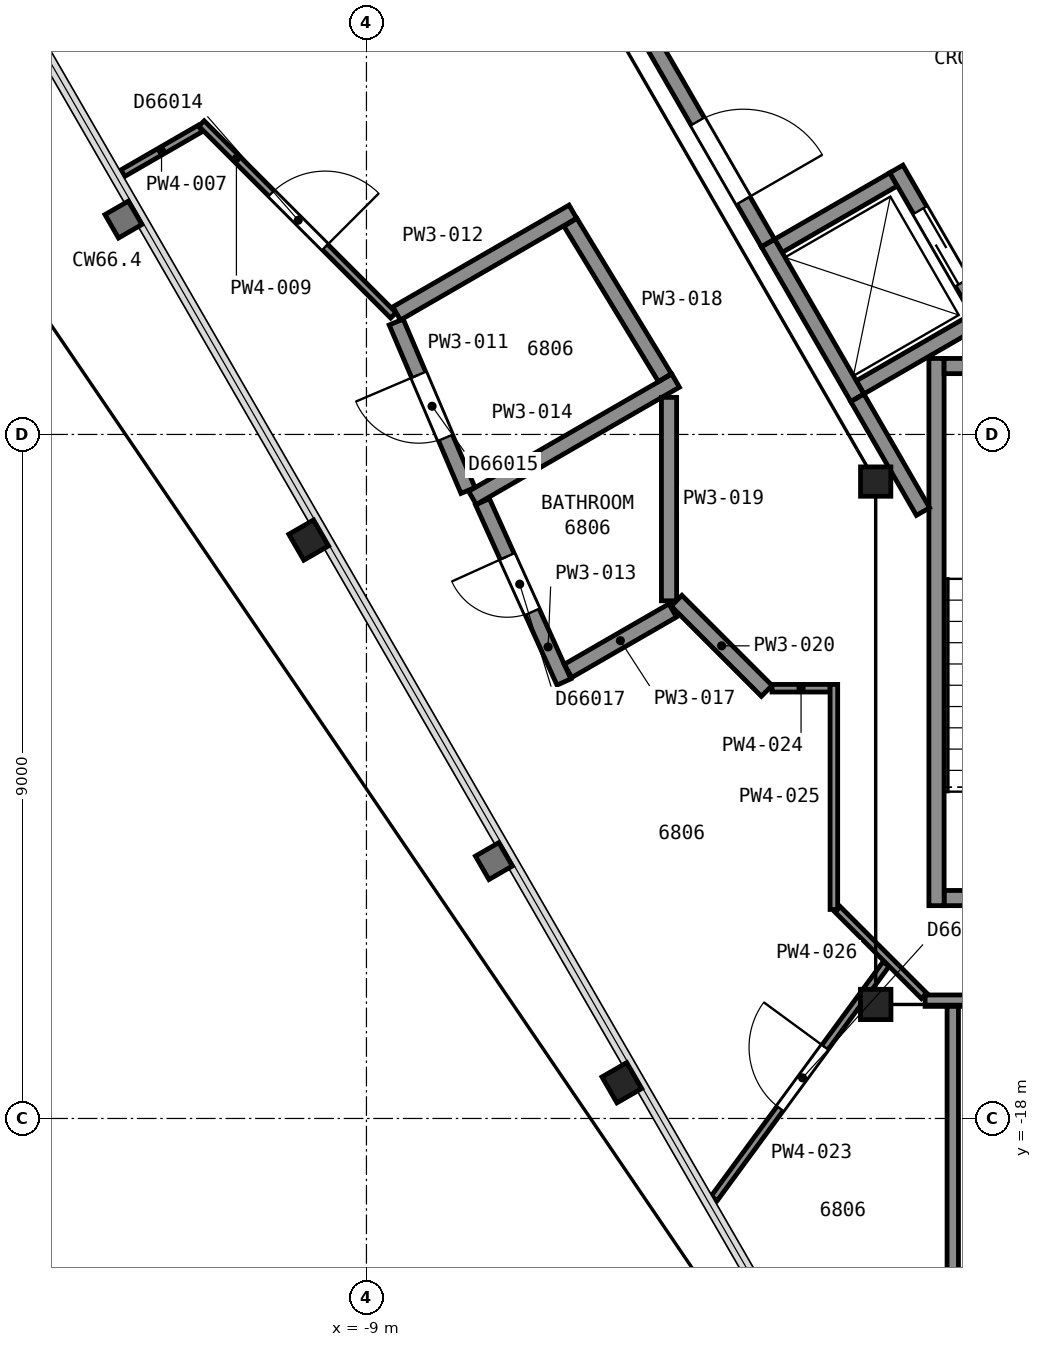
"""IFC4 building model, lengths in metres.
Left out: names, types, materials, properties, quantities, classifications, styles, units other than length and angle.
Written with IfcOpenShell. Run it as: python <this file> out.ifc"""

import sys

from ifc_helpers import new_model, si_unit, direction, frame, frame_2d, origin, origin_2d, place, context, subcontext, project, spatial, rectangle, i_section, extrude, element, fill, save


model = new_model("IFC4")
c1 = context("Model", 3, precision=1e-05, world=origin(), true_north=direction((0.0, 1.0)))
c2 = subcontext(c1, "Body", "Model", "MODEL_VIEW")
j1 = project(units=[si_unit("LENGTHUNIT", "METRE"), si_unit("PLANEANGLEUNIT", "RADIAN")], contexts=[c1])
p1 = place(None, origin())
s1 = spatial("IfcSite", under=j1, at=p1, CompositionType="ELEMENT")
p2 = place(p1, origin())
s2 = spatial("IfcBuilding", under=s1, at=p2, CompositionType="ELEMENT")
p3 = place(p2, frame((0.0, 0.0, 271.4)))
s3 = spatial("IfcBuildingStorey", under=s2, at=p3, CompositionType="ELEMENT", Elevation=271.4)
for number, where, z_axis, x_axis in (
    (1, (-9.76, -10.39, 0.0), (0.0, 0.0, 1.0), (-0.5, 0.866, 0.0)),
    (2, (-5.64, -17.53, 0.0), (0.0, 0.0, 1.0), (-0.5, 0.866, 0.0)),
):
    element("IfcColumn", number, at=place(p3, frame(where, z_axis=z_axis, x_axis=x_axis)), inside=s3, PredefinedType="COLUMN", context=c2, shape_type="SweptSolid", body=[
        extrude(i_section(OverallWidth=0.394, OverallDepth=0.376, WebThickness=0.017, FlangeThickness=0.028, FilletRadius=0.015, at=origin_2d()), origin(), (0.0, 0.0, 1.0), 3.7),
    ])
p4 = place(p3, frame((-2.3, -9.62, 0.0), z_axis=(0.0, 0.0, 1.0), x_axis=(1.0, 0.0, 0.0)))
e3 = element("IfcColumn", 3, at=p4, inside=s3, PredefinedType="COLUMN", context=c2, shape_type="SweptSolid", body=[
    extrude(i_section(OverallWidth=0.399, OverallDepth=0.386, WebThickness=0.021, FlangeThickness=0.033, FilletRadius=0.015, at=origin_2d()), origin(), (0.0, 0.0, 1.0), 3.7),
])
p5 = place(p3, frame((-2.3, -16.5, 0.0), z_axis=(0.0, 0.0, 1.0), x_axis=(-1.0, 0.0, 0.0)))
e4 = element("IfcColumn", 4, at=p5, inside=s3, PredefinedType="COLUMN", context=c2, shape_type="SweptSolid", body=[
    extrude(i_section(OverallWidth=0.401, OverallDepth=0.399, WebThickness=0.025, FlangeThickness=0.04, FilletRadius=0.015, at=origin_2d()), origin(), (0.0, 0.0, 1.0), 3.7),
])
p6 = place(p3, frame((-1.4, -15.1, 0.0), z_axis=(0.0, 0.0, 1.0), x_axis=(1.0, 0.0, 0.0)))
e5 = element("IfcWall", 5, at=p6, inside=s3, PredefinedType="PARTITIONING", context=c2, shape_type="SweptSolid", body=[
    extrude(rectangle(XDim=2.8, YDim=0.2, at=frame_2d((1.4, 0.0))), origin(), (0.0, 0.0, 1.0), 3.45),
])
p7 = place(p6, frame((0.85, 0.0, 0.0)))
e6 = element("IfcOpeningElement", 6, at=p7, cuts=e5, PredefinedType="OPENING", context=c2, shape_type="SweptSolid", body=[
    extrude(rectangle(XDim=1.1, YDim=2.1, at=frame_2d((0.55, 1.05))), frame((0.0, 0.11, 0.0), z_axis=(0.0, -1.0, 0.0), x_axis=(1.0, 0.0, 0.0)), (0.0, 0.0, 1.0), 0.22),
])
p8 = place(p3, frame((-1.5, -8.0, 0.0), z_axis=(0.0, 0.0, 1.0), x_axis=(0.0, -1.0, 0.0)))
e7 = element("IfcWall", 7, at=p8, inside=s3, PredefinedType="PARTITIONING", context=c2, shape_type="SweptSolid", body=[
    extrude(rectangle(XDim=7.2, YDim=0.2, at=frame_2d((3.6, 0.0))), origin(), (0.0, 0.0, 1.0), 3.45),
])
p9 = place(p3, frame((-1.4, -8.1, 0.0), z_axis=(0.0, 0.0, 1.0), x_axis=(1.0, 0.0, 0.0)))
e8 = element("IfcWall", 8, at=p9, inside=s3, PredefinedType="PARTITIONING", context=c2, shape_type="SweptSolid", body=[
    extrude(rectangle(XDim=2.8, YDim=0.2, at=frame_2d((1.4, 0.0))), origin(), (0.0, 0.0, 1.0), 3.45),
])
for number, where, z_axis, x_axis in (
    (9, (-2.505, -8.38, 0.0), (0.0, 0.0, 1.0), (0.866, 0.5, 0.0)),
    (10, (-3.58, -6.519, 0.0), (0.0, 0.0, 1.0), (0.866, 0.5, 0.0)),
):
    element("IfcWall", number, at=place(p3, frame(where, z_axis=z_axis, x_axis=x_axis)), inside=s3, PredefinedType="PARTITIONING", context=c2, shape_type="SweptSolid", body=[
        extrude(rectangle(XDim=1.75, YDim=0.2, at=frame_2d((0.875, 0.0))), origin(), (0.0, 0.0, 1.0), 3.7),
    ])
p10 = place(p3, frame((-0.853, -7.542, 0.0), z_axis=(0.0, 0.0, 1.0), x_axis=(-0.500016218704, 0.866016039709, 0.0)))
e11 = element("IfcWall", 11, at=p10, inside=s3, PredefinedType="PARTITIONING", context=c2, shape_type="SweptSolid", body=[
    extrude(rectangle(XDim=2.35, YDim=0.2, at=frame_2d((1.175, 0.0))), origin(), (0.0, 0.0, 1.0), 3.7),
])
p11 = place(p10, frame((0.625, 0.0, 0.0)))
e12 = element("IfcOpeningElement", 12, at=p11, cuts=e11, PredefinedType="OPENING", context=c2, shape_type="SweptSolid", body=[
    extrude(rectangle(XDim=1.1, YDim=2.1, at=frame_2d((0.55, 1.05))), frame((0.0, 0.11, 0.0), z_axis=(0.0, -1.0, 0.0), x_axis=(1.0, 0.0, 0.0)), (0.0, 0.0, 1.0), 0.22),
])
p12 = place(p3, frame((-2.542, -8.517, 0.0), z_axis=(0.0, 0.0, 1.0), x_axis=(-0.500016218704, 0.866016039709, 0.0)))
e13 = element("IfcWall", 13, at=p12, inside=s3, PredefinedType="PARTITIONING", context=c2, shape_type="SweptSolid", body=[
    extrude(rectangle(XDim=2.35, YDim=0.2, at=frame_2d((1.175, 0.0))), origin(), (0.0, 0.0, 1.0), 3.7),
])
p13 = place(p3, frame((-7.141, -0.551, 0.0), z_axis=(0.0, 0.0, 1.0), x_axis=(0.500001302854, -0.86602465158, 0.0)))
e14 = element("IfcWall", 14, at=p13, inside=s3, PredefinedType="PARTITIONING", context=c2, shape_type="SweptSolid", body=[
    extrude(rectangle(XDim=6.846, YDim=0.2, at=frame_2d((3.423, 0.0))), origin(), (0.0, 0.0, 1.0), 3.45),
])
p14 = place(p13, frame((5.0, 0.0, 0.0)))
e15 = element("IfcOpeningElement", 15, at=p14, cuts=e14, PredefinedType="OPENING", context=c2, shape_type="SweptSolid", body=[
    extrude(rectangle(XDim=1.2, YDim=2.1, at=frame_2d((0.6, 1.05))), frame((0.0, 0.11, 0.0), z_axis=(0.0, -1.0, 0.0), x_axis=(1.0, 0.0, 0.0)), (0.0, 0.0, 1.0), 0.22),
])
p15 = place(p3, frame((-2.541, -8.519, 0.0), z_axis=(0.0, 0.0, 1.0), x_axis=(0.500016142392, -0.86601608377, 0.0)))
e16 = element("IfcWall", 16, at=p15, inside=s3, PredefinedType="PARTITIONING", context=c2, shape_type="SweptSolid", body=[
    extrude(rectangle(XDim=1.727, YDim=0.2, at=frame_2d((0.864, 0.0))), origin(), (0.0, 0.0, 1.0), 3.45),
])
p16 = place(p3, frame((-12.205, -5.562, 0.0), z_axis=(0.0, 0.0, 1.0), x_axis=(0.865895054285, 0.500225704022, 0.0)))
e17 = element("IfcWall", 17, at=p16, inside=s3, PredefinedType="PARTITIONING", context=c2, shape_type="SweptSolid", body=[
    extrude(rectangle(XDim=1.176, YDim=0.1, at=frame_2d((0.588, 0.0))), origin(), (0.0, 0.0, 1.0), 2.723),
])
p17 = place(p3, frame((-8.646, -7.433, 0.0), z_axis=(0.0, 0.0, 1.0), x_axis=(-0.707106781187, 0.707106781187, 0.0)))
e18 = element("IfcWall", 18, at=p17, inside=s3, PredefinedType="PARTITIONING", context=c2, shape_type="SweptSolid", body=[
    extrude(rectangle(XDim=3.57, YDim=0.1, at=frame_2d((1.785, 0.0))), origin(), (0.0, 0.0, 1.0), 2.723),
])
p18 = place(p17, frame((1.27, 0.0, 0.0)))
e19 = element("IfcOpeningElement", 19, at=p18, cuts=e18, PredefinedType="OPENING", context=c2, shape_type="SweptSolid", body=[
    extrude(rectangle(XDim=1.0, YDim=2.1, at=frame_2d((0.5, 1.05))), frame((0.0, 0.06, 0.0), z_axis=(0.0, -1.0, 0.0), x_axis=(1.0, 0.0, 0.0)), (0.0, 0.0, 1.0), 0.12),
])
p19 = place(p3, frame((-8.609, -7.521, 0.0), z_axis=(0.0, 0.0, 1.0), x_axis=(0.391998641344, -0.91996579566, 0.0)))
e20 = element("IfcWall", 20, at=p19, inside=s3, PredefinedType="PARTITIONING", context=c2, shape_type="SweptSolid", body=[
    extrude(rectangle(XDim=2.41, YDim=0.2, at=frame_2d((1.205, 0.0))), origin(), (0.0, 0.0, 1.0), 2.723),
])
p20 = place(p19, frame((0.755, 0.0, 0.0)))
e21 = element("IfcOpeningElement", 21, at=p20, cuts=e20, PredefinedType="OPENING", context=c2, shape_type="SweptSolid", body=[
    extrude(rectangle(XDim=0.9, YDim=2.1, at=frame_2d((0.45, 1.05))), frame((0.0, 0.11, 0.0), z_axis=(0.0, -1.0, 0.0), x_axis=(1.0, 0.0, 0.0)), (0.0, 0.0, 1.0), 0.22),
])
p21 = place(p3, frame((-8.603, -7.408, 0.0), z_axis=(0.0, 0.0, 1.0), x_axis=(0.865966883336, 0.500101346695, 0.0)))
e22 = element("IfcWall", 22, at=p21, inside=s3, PredefinedType="PARTITIONING", context=c2, shape_type="SweptSolid", body=[
    extrude(rectangle(XDim=2.677, YDim=0.2, at=frame_2d((1.339, 0.0))), origin(), (0.0, 0.0, 1.0), 2.723),
])
p22 = place(p3, frame((-7.474, -9.885, 0.0), z_axis=(0.0, 0.0, 1.0), x_axis=(0.411787773138, -0.911279775862, 0.0)))
e23 = element("IfcWall", 23, at=p22, inside=s3, PredefinedType="PARTITIONING", context=c2, shape_type="SweptSolid", body=[
    extrude(rectangle(XDim=2.603, YDim=0.2, at=frame_2d((1.301, 0.0))), origin(), (0.0, 0.0, 1.0), 2.723),
])
p23 = place(p22, frame((0.79, 0.0, 0.0)))
e24 = element("IfcOpeningElement", 24, at=p23, cuts=e23, PredefinedType="OPENING", context=c2, shape_type="SweptSolid", body=[
    extrude(rectangle(XDim=0.8, YDim=2.1, at=frame_2d((0.4, 1.05))), frame((0.0, 0.11, 0.0), z_axis=(0.0, -1.0, 0.0), x_axis=(1.0, 0.0, 0.0)), (0.0, 0.0, 1.0), 0.22),
])
p24 = place(p3, frame((-7.606, -9.835, 0.0), z_axis=(0.0, 0.0, 1.0), x_axis=(0.866093395895, 0.499882215713, 0.0)))
e25 = element("IfcWall", 25, at=p24, inside=s3, PredefinedType="PARTITIONING", context=c2, shape_type="SweptSolid", body=[
    extrude(rectangle(XDim=3.087, YDim=0.2, at=frame_2d((1.543, 0.0))), origin(), (0.0, 0.0, 1.0), 2.723),
])
p25 = place(p3, frame((-6.348, -12.111, 0.0), z_axis=(0.0, 0.0, 1.0), x_axis=(0.866004001318, 0.500037068326, 0.0)))
e26 = element("IfcWall", 26, at=p25, inside=s3, PredefinedType="PARTITIONING", context=c2, shape_type="SweptSolid", body=[
    extrude(rectangle(XDim=1.59, YDim=0.2, at=frame_2d((0.795, 0.0))), origin(), (0.0, 0.0, 1.0), 2.723),
])
p26 = place(p3, frame((-6.316, -6.209, 0.0), z_axis=(0.0, 0.0, 1.0), x_axis=(0.519665190876, -0.854369995606, 0.0)))
e27 = element("IfcWall", 27, at=p26, inside=s3, PredefinedType="PARTITIONING", context=c2, shape_type="SweptSolid", body=[
    extrude(rectangle(XDim=2.392, YDim=0.2, at=frame_2d((1.196, 0.0))), origin(), (0.0, 0.0, 1.0), 2.723),
])
p27 = place(p3, frame((-5.019, -11.189, 0.0), z_axis=(0.0, 0.0, 1.0), x_axis=(0.0, 1.0, 0.0)))
e28 = element("IfcWall", 28, at=p27, inside=s3, PredefinedType="PARTITIONING", context=c2, shape_type="SweptSolid", body=[
    extrude(rectangle(XDim=2.677, YDim=0.2, at=frame_2d((1.338, 0.0))), origin(), (0.0, 0.0, 1.0), 2.723),
])
p28 = place(p3, frame((-4.92, -11.188, 0.0), z_axis=(0.0, 0.0, 1.0), x_axis=(0.707106781187, -0.707106781187, 0.0)))
e29 = element("IfcWall", 29, at=p28, inside=s3, PredefinedType="PARTITIONING", context=c2, shape_type="SweptSolid", body=[
    extrude(rectangle(XDim=1.678, YDim=0.2, at=frame_2d((0.839, 0.0))), origin(), (0.0, 0.0, 1.0), 2.723),
])
p29 = place(p3, frame((-2.164, -15.968, 0.0), z_axis=(0.0, 0.0, 1.0), x_axis=(-0.591435630084, -0.806352215516, 0.0)))
e30 = element("IfcWall", 30, at=p29, inside=s3, PredefinedType="PARTITIONING", context=c2, shape_type="SweptSolid", body=[
    extrude(rectangle(XDim=3.824, YDim=0.1, at=frame_2d((1.912, 0.0))), origin(), (0.0, 0.0, 1.0), 2.723),
])
p30 = place(p29, frame((1.358, 0.0, 0.0)))
e31 = element("IfcOpeningElement", 31, at=p30, cuts=e30, PredefinedType="OPENING", context=c2, shape_type="SweptSolid", body=[
    extrude(rectangle(XDim=1.0, YDim=2.1, at=frame_2d((0.5, 1.05))), frame((0.0, 0.06, 0.0), z_axis=(0.0, -1.0, 0.0), x_axis=(1.0, 0.0, 0.0)), (0.0, 0.0, 1.0), 0.12),
])
p31 = place(p3, frame((-3.664, -12.339, 0.0), z_axis=(0.0, 0.0, 1.0), x_axis=(1.0, 0.0, 0.0)))
e32 = element("IfcWall", 32, at=p31, inside=s3, PredefinedType="PARTITIONING", context=c2, shape_type="SweptSolid", body=[
    extrude(rectangle(XDim=0.764, YDim=0.1, at=frame_2d((0.382, 0.0))), origin(), (0.0, 0.0, 1.0), 2.723),
])
p32 = place(p3, frame((-2.85, -15.25, 0.0), z_axis=(0.0, 0.0, 1.0), x_axis=(0.0, 1.0, 0.0)))
e33 = element("IfcWall", 33, at=p32, inside=s3, PredefinedType="PARTITIONING", context=c2, shape_type="SweptSolid", body=[
    extrude(rectangle(XDim=2.961, YDim=0.1, at=frame_2d((1.48, 0.0))), origin(), (0.0, 0.0, 1.0), 2.723),
])
p33 = place(p3, frame((-2.801, -15.25, 0.0), z_axis=(0.0, 0.0, 1.0), x_axis=(0.707106781187, -0.707106781187, 0.0)))
e34 = element("IfcWall", 34, at=p33, inside=s3, PredefinedType="PARTITIONING", context=c2, shape_type="SweptSolid", body=[
    extrude(rectangle(XDim=1.608, YDim=0.1, at=frame_2d((0.804, 0.0))), origin(), (0.0, 0.0, 1.0), 2.723),
])
p34 = place(p3, frame((-1.65, -16.45, 0.0), z_axis=(0.0, 0.0, 1.0), x_axis=(1.0, 0.0, 0.0)))
e35 = element("IfcWall", 35, at=p34, inside=s3, PredefinedType="PARTITIONING", context=c2, shape_type="SweptSolid", body=[
    extrude(rectangle(XDim=2.625, YDim=0.15, at=frame_2d((1.312, 0.0))), origin(), (0.0, 0.0, 1.0), 2.723),
])
p35 = place(p3, frame((-1.286, -24.421, 0.0), z_axis=(0.0, 0.0, 1.0), x_axis=(0.0, 1.0, 0.0)))
e36 = element("IfcWall", 36, at=p35, inside=s3, PredefinedType="PARTITIONING", context=c2, shape_type="SweptSolid", body=[
    extrude(rectangle(XDim=7.896, YDim=0.15, at=frame_2d((3.948, 0.0))), origin(), (0.0, 0.0, 1.0), 2.723),
])
p36 = place(p11, origin())
e37 = element("IfcDoor", 37, at=p36, inside=s3, OperationType="SLIDING_TO_LEFT", PredefinedType="DOOR", context=c2, shape_type="SweptSolid", body=[
    extrude(rectangle(XDim=1.1, YDim=2.1, at=frame_2d((0.55, 1.05))), frame((0.0, 0.025, 0.0), z_axis=(0.0, -1.0, 0.0), x_axis=(1.0, 0.0, 0.0)), (0.0, 0.0, 1.0), 0.05),
])
fill(e12, e37)
p37 = place(p14, origin())
e38 = element("IfcDoor", 38, at=p37, inside=s3, OperationType="SINGLE_SWING_RIGHT", PredefinedType="DOOR", context=c2, shape_type="SweptSolid", body=[
    extrude(rectangle(XDim=1.2, YDim=2.1, at=frame_2d((0.6, 1.05))), frame((0.0, 0.025, 0.0), z_axis=(0.0, -1.0, 0.0), x_axis=(1.0, 0.0, 0.0)), (0.0, 0.0, 1.0), 0.05),
])
fill(e15, e38)
p38 = place(p18, origin())
e39 = element("IfcDoor", 39, at=p38, inside=s3, OperationType="SINGLE_SWING_LEFT", PredefinedType="DOOR", context=c2, shape_type="SweptSolid", body=[
    extrude(rectangle(XDim=1.0, YDim=2.1, at=frame_2d((0.5, 1.05))), frame((0.0, 0.025, 0.0), z_axis=(0.0, -1.0, 0.0), x_axis=(1.0, 0.0, 0.0)), (0.0, 0.0, 1.0), 0.05),
])
fill(e19, e39)
p39 = place(p20, origin())
e40 = element("IfcDoor", 40, at=p39, inside=s3, OperationType="SINGLE_SWING_LEFT", PredefinedType="DOOR", context=c2, shape_type="SweptSolid", body=[
    extrude(rectangle(XDim=0.9, YDim=2.1, at=frame_2d((0.45, 1.05))), frame((0.0, 0.025, 0.0), z_axis=(0.0, -1.0, 0.0), x_axis=(1.0, 0.0, 0.0)), (0.0, 0.0, 1.0), 0.05),
])
fill(e21, e40)
p40 = place(p23, origin())
e41 = element("IfcDoor", 41, at=p40, inside=s3, OperationType="SINGLE_SWING_LEFT", PredefinedType="DOOR", context=c2, shape_type="SweptSolid", body=[
    extrude(rectangle(XDim=0.8, YDim=2.1, at=frame_2d((0.4, 1.05))), frame((0.0, 0.025, 0.0), z_axis=(0.0, -1.0, 0.0), x_axis=(1.0, 0.0, 0.0)), (0.0, 0.0, 1.0), 0.05),
])
fill(e24, e41)
p41 = place(p30, origin())
e42 = element("IfcDoor", 42, at=p41, inside=s3, OperationType="SINGLE_SWING_LEFT", PredefinedType="DOOR", context=c2, shape_type="SweptSolid", body=[
    extrude(rectangle(XDim=1.0, YDim=2.1, at=frame_2d((0.5, 1.05))), frame((0.0, 0.025, 0.0), z_axis=(0.0, -1.0, 0.0), x_axis=(1.0, 0.0, 0.0)), (0.0, 0.0, 1.0), 0.05),
])
fill(e31, e42)
save(model, sys.argv[1])
